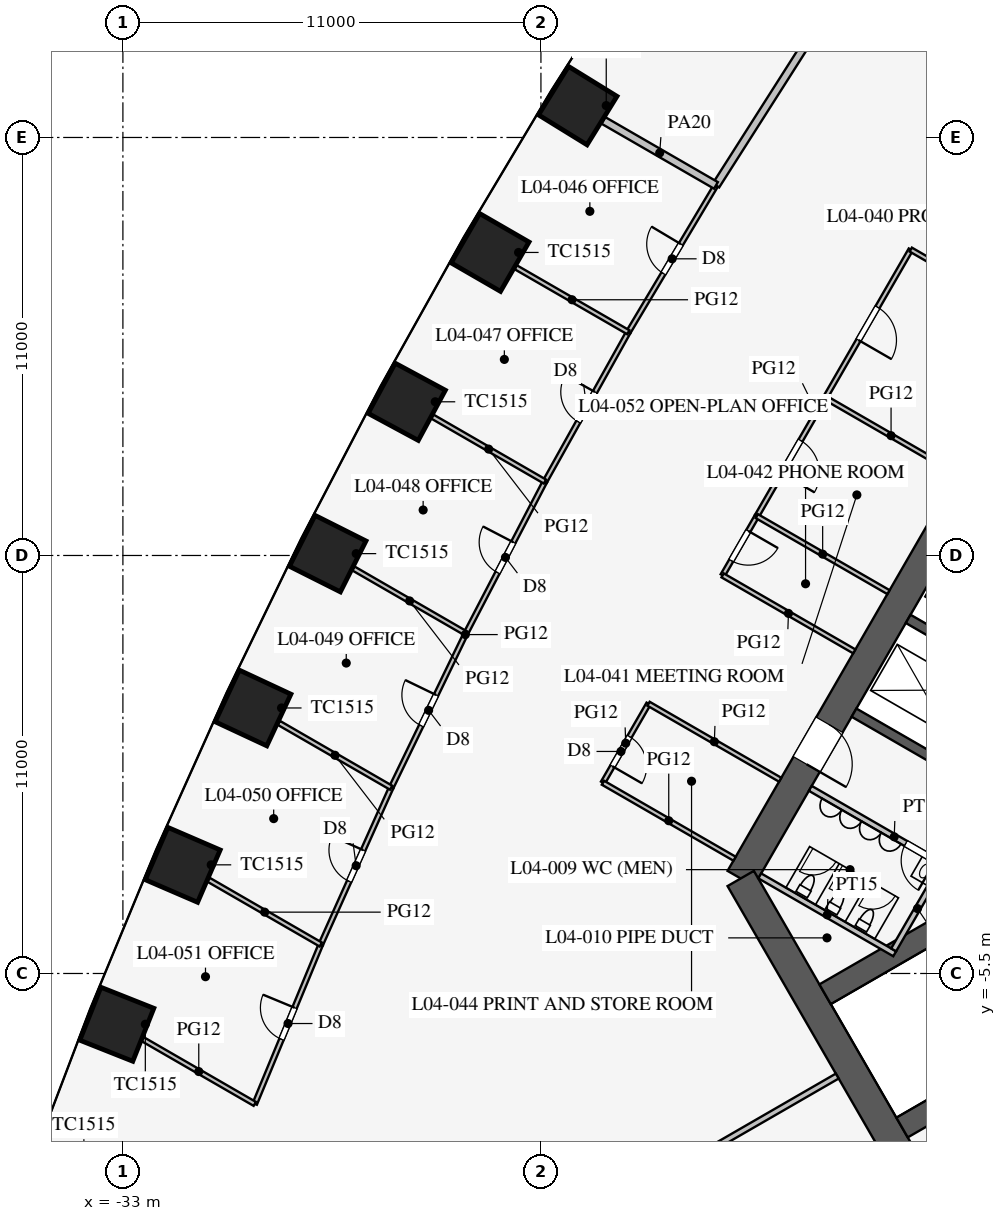
"""IFC4 building model, lengths in metres.
Left out: names, types, materials, properties, quantities, classifications, styles, units other than length and angle.
Written with IfcOpenShell. Run it as: python <this file> out.ifc"""

import sys

from ifc_helpers import new_model, si_unit, direction, frame, frame_2d, origin, origin_2d, place, context, subcontext, project, spatial, rectangle, extrude, element, fill, save


model = new_model("IFC4")
c1 = context("Model", 3, precision=1e-05, world=origin(), true_north=direction((0.0, 1.0)))
c2 = subcontext(c1, "Body", "Model", "MODEL_VIEW")
j1 = project(units=[si_unit("LENGTHUNIT", "METRE"), si_unit("PLANEANGLEUNIT", "RADIAN")], contexts=[c1])
p1 = place(None, origin())
s1 = spatial("IfcSite", under=j1, at=p1, CompositionType="ELEMENT")
p2 = place(p1, origin())
s2 = spatial("IfcBuilding", under=s1, at=p2, CompositionType="ELEMENT")
p3 = place(p2, frame((0.0, 0.0, 20.7)))
s3 = spatial("IfcBuildingStorey", under=s2, at=p3, CompositionType="ELEMENT", Elevation=20.7)
for number, where, z_axis, x_axis in (
    (1, (-21.031, 17.339, 0.0), (0.0, 0.0, 1.0), (-0.525, -0.851, 0.0)),
    (2, (-23.338, 13.474, 0.0), (0.0, 0.0, 1.0), (-0.5, -0.866, 0.0)),
    (3, (-25.531, 9.544, 0.0), (0.0, 0.0, 1.0), (-0.475, -0.88, 0.0)),
    (4, (-27.611, 5.549, 0.0), (0.0, 0.0, 1.0), (-0.449, -0.894, 0.0)),
    (5, (-29.576, 1.487, 0.0), (0.0, 0.0, 1.0), (-0.423, -0.906, 0.0)),
    (6, (-31.426, -2.641, 0.0), (0.0, 0.0, 1.0), (-0.396, -0.918, 0.0)),
    (7, (-33.16, -6.836, 0.0), (0.0, 0.0, 1.0), (-0.369, -0.929, 0.0)),
):
    element("IfcColumn", number, at=place(p3, frame(where, z_axis=z_axis, x_axis=x_axis)), inside=s3, PredefinedType="COLUMN", context=c2, shape_type="SweptSolid", body=[
        extrude(rectangle(XDim=1.5, YDim=1.5, at=origin_2d()), origin(), (0.0, 0.0, 1.0), 4.2),
    ])
p4 = place(p3, frame((-5.773, 16.0, 0.0), z_axis=(0.0, 0.0, 1.0), x_axis=(-0.500002442456, -0.866023993627, 0.0)))
e8 = element("IfcWall", 8, at=p4, inside=s3, PredefinedType="SHEAR", context=c2, shape_type="SweptSolid", body=[
    extrude(rectangle(XDim=21.939, YDim=0.8, at=frame_2d((10.97, 0.0))), origin(), (0.0, 0.0, 1.0), 4.2),
])
p5 = place(p4, frame((17.27, 0.0, 0.0)))
e9 = element("IfcOpeningElement", 9, at=p5, cuts=e8, PredefinedType="OPENING", context=c2, shape_type="SweptSolid", body=[
    extrude(rectangle(XDim=1.2, YDim=2.1, at=frame_2d((0.6, 1.05))), frame((0.0, 0.41, 0.0), z_axis=(0.0, -1.0, 0.0), x_axis=(1.0, 0.0, 0.0)), (0.0, 0.0, 1.0), 0.82),
])
p6 = place(p4, frame((3.47, 0.0, 0.0)))
e10 = element("IfcOpeningElement", 10, at=p6, cuts=e8, PredefinedType="OPENING", context=c2, shape_type="SweptSolid", body=[
    extrude(rectangle(XDim=1.2, YDim=2.1, at=frame_2d((0.6, 1.05))), frame((0.0, 0.41, 0.0), z_axis=(0.0, -1.0, 0.0), x_axis=(1.0, 0.0, 0.0)), (0.0, 0.0, 1.0), 0.82),
])
p7 = place(p3, frame((-16.743, -3.0, 0.0), z_axis=(0.0, 0.0, 1.0), x_axis=(0.499995765644, -0.866027848477, 0.0)))
e11 = element("IfcWall", 11, at=p7, inside=s3, PredefinedType="SHEAR", context=c2, shape_type="SweptSolid", body=[
    extrude(rectangle(XDim=11.547, YDim=0.8, at=frame_2d((5.773, 0.0))), origin(), (0.0, 0.0, 1.0), 4.2),
])
for number, where, z_axis, x_axis in (
    (12, (-10.107, 2.544, 0.0), (0.0, 0.0, 1.0), (-0.866, 0.5, 0.0)),
    (13, (-11.532, 0.076, 0.0), (0.0, 0.0, 1.0), (-0.866, 0.5, 0.0)),
):
    element("IfcWall", number, at=place(p3, frame(where, z_axis=z_axis, x_axis=x_axis)), inside=s3, PredefinedType="SHEAR", context=c2, shape_type="SweptSolid", body=[
        extrude(rectangle(XDim=2.575, YDim=0.25, at=frame_2d((1.288, 0.0))), origin(), (0.0, 0.0, 1.0), 4.2),
    ])
for number, where, z_axis, x_axis in (
    (14, (-6.663, -1.509, 0.0), (0.0, 0.0, 1.0), (-0.866, -0.5, 0.0)),
    (15, (-4.638, -5.016, 0.0), (0.0, 0.0, 1.0), (-0.866, -0.5, 0.0)),
):
    element("IfcWall", number, at=place(p3, frame(where, z_axis=z_axis, x_axis=x_axis)), inside=s3, PredefinedType="SHEAR", context=c2, shape_type="SweptSolid", body=[
        extrude(rectangle(XDim=9.075, YDim=0.6, at=frame_2d((4.538, 0.0))), origin(), (0.0, 0.0, 1.0), 4.2),
    ])
p8 = place(p3, frame((-10.495, -3.178, 0.0), z_axis=(0.0, 0.0, 1.0), x_axis=(-0.86602216432, 0.500005610874, 0.0)))
e16 = element("IfcWall", 16, at=p8, inside=s3, PredefinedType="PARTITIONING", context=c2, shape_type="SweptSolid", body=[
    extrude(rectangle(XDim=5.1, YDim=0.15, at=frame_2d((2.55, 0.0))), origin(), (0.0, 0.0, 1.0), 4.0),
])
p9 = place(p8, frame((1.3, 0.0, 0.0)))
e17 = element("IfcOpeningElement", 17, at=p9, cuts=e16, PredefinedType="OPENING", context=c2, shape_type="SweptSolid", body=[
    extrude(rectangle(XDim=0.9, YDim=2.1, at=frame_2d((0.45, 1.05))), frame((0.0, 0.085, 0.0), z_axis=(0.0, -1.0, 0.0), x_axis=(1.0, 0.0, 0.0)), (0.0, 0.0, 1.0), 0.17),
])
p10 = place(p3, frame((-12.691, -4.982, 0.0), z_axis=(0.0, 0.0, 1.0), x_axis=(-0.8660249478, 0.500000789788, 0.0)))
e18 = element("IfcWall", 18, at=p10, inside=s3, PredefinedType="PARTITIONING", context=c2, shape_type="SweptSolid", body=[
    extrude(rectangle(XDim=4.1, YDim=0.15, at=frame_2d((2.05, 0.0))), origin(), (0.0, 0.0, 1.0), 4.0),
])
p11 = place(p3, frame((-11.464, -2.706, 0.0), z_axis=(0.0, 0.0, 1.0), x_axis=(-0.50001992892, -0.866013897511, 0.0)))
e19 = element("IfcWall", 19, at=p11, inside=s3, PredefinedType="PARTITIONING", context=c2, shape_type="SweptSolid", body=[
    extrude(rectangle(XDim=2.51, YDim=0.15, at=frame_2d((1.255, 0.0))), origin(), (0.0, 0.0, 1.0), 4.0),
])
p12 = place(p3, frame((-14.203, -8.2, 0.0), z_axis=(0.0, 0.0, 1.0), x_axis=(-0.866024965723, -0.500000758745, 0.0)))
e20 = element("IfcWall", 20, at=p12, inside=s3, PredefinedType="PARTITIONING", context=c2, shape_type="SweptSolid", body=[
    extrude(rectangle(XDim=18.25, YDim=0.15, at=frame_2d((9.125, 0.0))), origin(), (0.0, 0.0, 1.0), 2.3),
])
p13 = place(p3, frame((-16.319, 6.535, 0.0), z_axis=(0.0, 0.0, 1.0), x_axis=(-0.499961193289, -0.866047807691, 0.0)))
e21 = element("IfcWall", 21, at=p13, inside=s3, PredefinedType="PARTITIONING", context=c2, shape_type="SweptSolid", body=[
    extrude(rectangle(XDim=1.8, YDim=0.12, at=frame_2d((0.9, 0.0))), origin(), (0.0, 0.0, 1.0), 2.9),
])
p14 = place(p13, frame((0.45, 0.0, 0.15)))
e22 = element("IfcOpeningElement", 22, at=p14, cuts=e21, PredefinedType="OPENING", context=c2, shape_type="SweptSolid", body=[
    extrude(rectangle(XDim=0.9, YDim=2.1, at=frame_2d((0.45, 1.05))), frame((0.0, 0.07, 0.0), z_axis=(0.0, -1.0, 0.0), x_axis=(1.0, 0.0, 0.0)), (0.0, 0.0, 1.0), 0.14),
])
p15 = place(p3, frame((-19.169, 1.599, 0.0), z_axis=(0.0, 0.0, 1.0), x_axis=(-0.499957262057, -0.866050077142, 0.0)))
e23 = element("IfcWall", 23, at=p15, inside=s3, PredefinedType="PARTITIONING", context=c2, shape_type="SweptSolid", body=[
    extrude(rectangle(XDim=2.4, YDim=0.12, at=frame_2d((1.2, 0.0))), origin(), (0.0, 0.0, 1.0), 2.9),
])
p16 = place(p15, frame((1.0, 0.0, 0.15)))
e24 = element("IfcOpeningElement", 24, at=p16, cuts=e23, PredefinedType="OPENING", context=c2, shape_type="SweptSolid", body=[
    extrude(rectangle(XDim=0.9, YDim=2.1, at=frame_2d((0.45, 1.05))), frame((0.0, 0.07, 0.0), z_axis=(0.0, -1.0, 0.0), x_axis=(1.0, 0.0, 0.0)), (0.0, 0.0, 1.0), 0.14),
])
p17 = place(p3, frame((-14.519, 9.653, 0.0), z_axis=(0.0, 0.0, 1.0), x_axis=(-0.500012057535, -0.866018442252, 0.0)))
e25 = element("IfcWall", 25, at=p17, inside=s3, PredefinedType="PARTITIONING", context=c2, shape_type="SweptSolid", body=[
    extrude(rectangle(XDim=3.6, YDim=0.12, at=frame_2d((1.8, 0.0))), origin(), (0.0, 0.0, 1.0), 2.9),
])
p18 = place(p17, frame((1.3, 0.0, 0.15)))
e26 = element("IfcOpeningElement", 26, at=p18, cuts=e25, PredefinedType="OPENING", context=c2, shape_type="SweptSolid", body=[
    extrude(rectangle(XDim=1.0, YDim=2.1, at=frame_2d((0.5, 1.05))), frame((0.0, 0.07, 0.0), z_axis=(0.0, -1.0, 0.0), x_axis=(1.0, 0.0, 0.0)), (0.0, 0.0, 1.0), 0.14),
])
p19 = place(p3, frame((-12.269, 13.55, 0.0), z_axis=(0.0, 0.0, 1.0), x_axis=(-0.499990139034, -0.866031096941, 0.0)))
e27 = element("IfcWall", 27, at=p19, inside=s3, PredefinedType="PARTITIONING", context=c2, shape_type="SweptSolid", body=[
    extrude(rectangle(XDim=4.5, YDim=0.12, at=frame_2d((2.25, 0.0))), origin(), (0.0, 0.0, 1.0), 2.9),
])
p20 = place(p19, frame((1.75, 0.0, 0.15)))
e28 = element("IfcOpeningElement", 28, at=p20, cuts=e27, PredefinedType="OPENING", context=c2, shape_type="SweptSolid", body=[
    extrude(rectangle(XDim=1.0, YDim=2.1, at=frame_2d((0.5, 1.05))), frame((0.0, 0.07, 0.0), z_axis=(0.0, -1.0, 0.0), x_axis=(1.0, 0.0, 0.0)), (0.0, 0.0, 1.0), 0.14),
])
for number, where, z_axis, x_axis in (
    (29, (-16.905, -2.48, 0.0), (0.0, 0.0, 1.0), (-0.866, 0.5, 0.0)),
    (30, (-12.855, 4.535, 0.0), (0.0, 0.0, 1.0), (-0.866, 0.5, 0.0)),
    (31, (-13.755, 2.976, 0.0), (0.0, 0.0, 1.0), (-0.866, 0.5, 0.0)),
    (32, (-15.705, -0.401, 0.0), (0.0, 0.0, 1.0), (-0.866, 0.5, 0.0)),
    (33, (-11.055, 7.653, 0.0), (0.0, 0.0, 1.0), (-0.866, 0.5, 0.0)),
    (34, (-8.805, 11.55, 0.0), (0.0, 0.0, 1.0), (-0.866, 0.5, 0.0)),
):
    element("IfcWall", number, at=place(p3, frame(where, z_axis=z_axis, x_axis=x_axis)), inside=s3, PredefinedType="PARTITIONING", context=c2, shape_type="SweptSolid", body=[
        extrude(rectangle(XDim=4.0, YDim=0.12, at=frame_2d((2.0, 0.0))), origin(), (0.0, 0.0, 1.0), 2.9),
    ])
p21 = place(p3, frame((-19.701, 11.374, 0.0), z_axis=(0.0, 0.0, 1.0), x_axis=(-0.487415216275, -0.87317031955, 0.0)))
e35 = element("IfcWall", 35, at=p21, inside=s3, PredefinedType="PARTITIONING", context=c2, shape_type="SweptSolid", body=[
    extrude(rectangle(XDim=4.5, YDim=0.12, at=frame_2d((2.25, 0.0))), origin(), (0.0, 0.0, 1.0), 2.9),
])
p22 = place(p21, frame((1.8, 0.0, 0.15)))
e36 = element("IfcOpeningElement", 36, at=p22, cuts=e35, PredefinedType="OPENING", context=c2, shape_type="SweptSolid", body=[
    extrude(rectangle(XDim=0.9, YDim=2.1, at=frame_2d((0.45, 1.05))), frame((0.0, 0.07, 0.0), z_axis=(0.0, -1.0, 0.0), x_axis=(1.0, 0.0, 0.0)), (0.0, 0.0, 1.0), 0.14),
])
p23 = place(p3, frame((-25.941, -0.611, 0.0), z_axis=(0.0, 0.0, 1.0), x_axis=(-0.409451055745, -0.912332084796, 0.0)))
e37 = element("IfcWall", 37, at=p23, inside=s3, PredefinedType="PARTITIONING", context=c2, shape_type="SweptSolid", body=[
    extrude(rectangle(XDim=4.523, YDim=0.12, at=frame_2d((2.262, 0.0))), origin(), (0.0, 0.0, 1.0), 2.9),
])
p24 = place(p23, frame((1.8, 0.0, 0.15)))
e38 = element("IfcOpeningElement", 38, at=p24, cuts=e37, PredefinedType="OPENING", context=c2, shape_type="SweptSolid", body=[
    extrude(rectangle(XDim=0.9, YDim=2.1, at=frame_2d((0.45, 1.05))), frame((0.0, 0.07, 0.0), z_axis=(0.0, -1.0, 0.0), x_axis=(1.0, 0.0, 0.0)), (0.0, 0.0, 1.0), 0.14),
])
p25 = place(p3, frame((-27.793, -4.738, 0.0), z_axis=(0.0, 0.0, 1.0), x_axis=(-0.382639984525, -0.923897527999, 0.0)))
e39 = element("IfcWall", 39, at=p25, inside=s3, PredefinedType="PARTITIONING", context=c2, shape_type="SweptSolid", body=[
    extrude(rectangle(XDim=4.539, YDim=0.12, at=frame_2d((2.27, 0.0))), origin(), (0.0, 0.0, 1.0), 2.9),
])
p26 = place(p25, frame((1.8, 0.0, 0.15)))
e40 = element("IfcOpeningElement", 40, at=p26, cuts=e39, PredefinedType="OPENING", context=c2, shape_type="SweptSolid", body=[
    extrude(rectangle(XDim=0.9, YDim=2.1, at=frame_2d((0.45, 1.05))), frame((0.0, 0.07, 0.0), z_axis=(0.0, -1.0, 0.0), x_axis=(1.0, 0.0, 0.0)), (0.0, 0.0, 1.0), 0.14),
])
p27 = place(p3, frame((-21.895, 7.445, 0.0), z_axis=(0.0, 0.0, 1.0), x_axis=(-0.461810056307, -0.886978845235, 0.0)))
e41 = element("IfcWall", 41, at=p27, inside=s3, PredefinedType="PARTITIONING", context=c2, shape_type="SweptSolid", body=[
    extrude(rectangle(XDim=4.504, YDim=0.12, at=frame_2d((2.252, 0.0))), origin(), (0.0, 0.0, 1.0), 2.9),
])
p28 = place(p27, frame((1.8, 0.0, 0.15)))
e42 = element("IfcOpeningElement", 42, at=p28, cuts=e41, PredefinedType="OPENING", context=c2, shape_type="SweptSolid", body=[
    extrude(rectangle(XDim=0.9, YDim=2.1, at=frame_2d((0.45, 1.05))), frame((0.0, 0.07, 0.0), z_axis=(0.0, -1.0, 0.0), x_axis=(1.0, 0.0, 0.0)), (0.0, 0.0, 1.0), 0.14),
])
p29 = place(p3, frame((-23.975, 3.449, 0.0), z_axis=(0.0, 0.0, 1.0), x_axis=(-0.435857917556, -0.900015486369, 0.0)))
e43 = element("IfcWall", 43, at=p29, inside=s3, PredefinedType="PARTITIONING", context=c2, shape_type="SweptSolid", body=[
    extrude(rectangle(XDim=4.512, YDim=0.12, at=frame_2d((2.256, 0.0))), origin(), (0.0, 0.0, 1.0), 2.9),
])
p30 = place(p29, frame((1.8, 0.0, 0.15)))
e44 = element("IfcOpeningElement", 44, at=p30, cuts=e43, PredefinedType="OPENING", context=c2, shape_type="SweptSolid", body=[
    extrude(rectangle(XDim=0.9, YDim=2.1, at=frame_2d((0.45, 1.05))), frame((0.0, 0.07, 0.0), z_axis=(0.0, -1.0, 0.0), x_axis=(1.0, 0.0, 0.0)), (0.0, 0.0, 1.0), 0.14),
])
p31 = place(p3, frame((-17.395, 15.239, 0.0), z_axis=(0.0, 0.0, 1.0), x_axis=(-0.512483962191, -0.858696796604, 0.0)))
e45 = element("IfcWall", 45, at=p31, inside=s3, PredefinedType="PARTITIONING", context=c2, shape_type="SweptSolid", body=[
    extrude(rectangle(XDim=4.5, YDim=0.12, at=frame_2d((2.25, 0.0))), origin(), (0.0, 0.0, 1.0), 2.9),
])
p32 = place(p31, frame((1.8, 0.0, 0.15)))
e46 = element("IfcOpeningElement", 46, at=p32, cuts=e45, PredefinedType="OPENING", context=c2, shape_type="SweptSolid", body=[
    extrude(rectangle(XDim=0.9, YDim=2.1, at=frame_2d((0.45, 1.05))), frame((0.0, 0.07, 0.0), z_axis=(0.0, -1.0, 0.0), x_axis=(1.0, 0.0, 0.0)), (0.0, 0.0, 1.0), 0.14),
])
p33 = place(p3, frame((-14.975, 19.038, 0.0), z_axis=(0.0, 0.0, 1.0), x_axis=(-0.537243691336, -0.843427066272, 0.0)))
e47 = element("IfcWall", 47, at=p33, inside=s3, PredefinedType="PARTITIONING", context=c2, shape_type="SweptSolid", body=[
    extrude(rectangle(XDim=4.504, YDim=0.2, at=frame_2d((2.252, 0.0))), origin(), (0.0, 0.0, 1.0), 2.9),
])
p34 = place(p3, frame((-19.701, 11.374, 0.0), z_axis=(0.0, 0.0, 1.0), x_axis=(-0.866007273829, 0.50003140069, 0.0)))
e48 = element("IfcWall", 48, at=p34, inside=s3, PredefinedType="PARTITIONING", context=c2, shape_type="SweptSolid", body=[
    extrude(rectangle(XDim=3.42, YDim=0.12, at=frame_2d((1.71, 0.0))), origin(), (0.0, 0.0, 1.0), 2.9),
])
p35 = place(p3, frame((-25.941, -0.611, 0.0), z_axis=(0.0, 0.0, 1.0), x_axis=(-0.866016478054, 0.500015459501, 0.0)))
e49 = element("IfcWall", 49, at=p35, inside=s3, PredefinedType="PARTITIONING", context=c2, shape_type="SweptSolid", body=[
    extrude(rectangle(XDim=3.414, YDim=0.12, at=frame_2d((1.707, 0.0))), origin(), (0.0, 0.0, 1.0), 2.9),
])
p36 = place(p3, frame((-27.793, -4.738, 0.0), z_axis=(0.0, 0.0, 1.0), x_axis=(-0.866040105854, 0.499974534403, 0.0)))
e50 = element("IfcWall", 50, at=p36, inside=s3, PredefinedType="PARTITIONING", context=c2, shape_type="SweptSolid", body=[
    extrude(rectangle(XDim=3.409, YDim=0.12, at=frame_2d((1.705, 0.0))), origin(), (0.0, 0.0, 1.0), 2.9),
])
p37 = place(p3, frame((-29.53, -8.932, 0.0), z_axis=(0.0, 0.0, 1.0), x_axis=(-0.866018335219, 0.500012242915, 0.0)))
e51 = element("IfcWall", 51, at=p37, inside=s3, PredefinedType="PARTITIONING", context=c2, shape_type="SweptSolid", body=[
    extrude(rectangle(XDim=3.403, YDim=0.12, at=frame_2d((1.702, 0.0))), origin(), (0.0, 0.0, 1.0), 2.9),
])
p38 = place(p3, frame((-21.895, 7.445, 0.0), z_axis=(0.0, 0.0, 1.0), x_axis=(-0.866015553834, 0.500017060227, 0.0)))
e52 = element("IfcWall", 52, at=p38, inside=s3, PredefinedType="PARTITIONING", context=c2, shape_type="SweptSolid", body=[
    extrude(rectangle(XDim=3.419, YDim=0.12, at=frame_2d((1.71, 0.0))), origin(), (0.0, 0.0, 1.0), 2.9),
])
p39 = place(p3, frame((-23.975, 3.449, 0.0), z_axis=(0.0, 0.0, 1.0), x_axis=(-0.866014265796, 0.500019291066, 0.0)))
e53 = element("IfcWall", 53, at=p39, inside=s3, PredefinedType="PARTITIONING", context=c2, shape_type="SweptSolid", body=[
    extrude(rectangle(XDim=3.417, YDim=0.12, at=frame_2d((1.708, 0.0))), origin(), (0.0, 0.0, 1.0), 2.9),
])
p40 = place(p3, frame((-17.395, 15.239, 0.0), z_axis=(0.0, 0.0, 1.0), x_axis=(-0.866015553834, 0.500017060227, 0.0)))
e54 = element("IfcWall", 54, at=p40, inside=s3, PredefinedType="PARTITIONING", context=c2, shape_type="SweptSolid", body=[
    extrude(rectangle(XDim=3.419, YDim=0.2, at=frame_2d((1.71, 0.0))), origin(), (0.0, 0.0, 1.0), 2.9),
])
p41 = place(p9, origin())
e55 = element("IfcDoor", 55, at=p41, inside=s3, OperationType="SINGLE_SWING_LEFT", PredefinedType="DOOR", context=c2, shape_type="SweptSolid", body=[
    extrude(rectangle(XDim=0.9, YDim=2.1, at=frame_2d((0.45, 1.05))), frame((0.0, 0.025, 0.0), z_axis=(0.0, -1.0, 0.0), x_axis=(1.0, 0.0, 0.0)), (0.0, 0.0, 1.0), 0.05),
])
fill(e17, e55)
p42 = place(p5, origin())
e56 = element("IfcDoor", 56, at=p42, inside=s3, OperationType="SINGLE_SWING_RIGHT", PredefinedType="DOOR", context=c2, shape_type="SweptSolid", body=[
    extrude(rectangle(XDim=1.2, YDim=2.1, at=frame_2d((0.6, 1.05))), frame((0.0, 0.025, 0.0), z_axis=(0.0, -1.0, 0.0), x_axis=(1.0, 0.0, 0.0)), (0.0, 0.0, 1.0), 0.05),
])
fill(e9, e56)
p43 = place(p20, origin())
e57 = element("IfcDoor", 57, at=p43, inside=s3, OperationType="SINGLE_SWING_RIGHT", PredefinedType="DOOR", context=c2, shape_type="SweptSolid", body=[
    extrude(rectangle(XDim=1.0, YDim=2.1, at=frame_2d((0.5, 1.05))), frame((0.0, 0.025, 0.0), z_axis=(0.0, -1.0, 0.0), x_axis=(1.0, 0.0, 0.0)), (0.0, 0.0, 1.0), 0.05),
])
fill(e28, e57)
p44 = place(p18, origin())
e58 = element("IfcDoor", 58, at=p44, inside=s3, OperationType="SINGLE_SWING_RIGHT", PredefinedType="DOOR", context=c2, shape_type="SweptSolid", body=[
    extrude(rectangle(XDim=1.0, YDim=2.1, at=frame_2d((0.5, 1.05))), frame((0.0, 0.025, 0.0), z_axis=(0.0, -1.0, 0.0), x_axis=(1.0, 0.0, 0.0)), (0.0, 0.0, 1.0), 0.05),
])
fill(e26, e58)
p45 = place(p14, origin())
e59 = element("IfcDoor", 59, at=p45, inside=s3, OperationType="SINGLE_SWING_LEFT", PredefinedType="DOOR", context=c2, shape_type="SweptSolid", body=[
    extrude(rectangle(XDim=0.9, YDim=2.1, at=frame_2d((0.45, 1.05))), frame((0.0, 0.025, 0.0), z_axis=(0.0, -1.0, 0.0), x_axis=(1.0, 0.0, 0.0)), (0.0, 0.0, 1.0), 0.05),
])
fill(e22, e59)
p46 = place(p16, origin())
e60 = element("IfcDoor", 60, at=p46, inside=s3, OperationType="SINGLE_SWING_RIGHT", PredefinedType="DOOR", context=c2, shape_type="SweptSolid", body=[
    extrude(rectangle(XDim=0.9, YDim=2.1, at=frame_2d((0.45, 1.05))), frame((0.0, 0.025, 0.0), z_axis=(0.0, -1.0, 0.0), x_axis=(1.0, 0.0, 0.0)), (0.0, 0.0, 1.0), 0.05),
])
fill(e24, e60)
p47 = place(p32, frame((0.9, 0.0, 0.0), z_axis=(0.0, 0.0, 1.0), x_axis=(-1.0, 0.0, 0.0)))
e61 = element("IfcDoor", 61, at=p47, inside=s3, OperationType="SINGLE_SWING_RIGHT", PredefinedType="DOOR", context=c2, shape_type="SweptSolid", body=[
    extrude(rectangle(XDim=0.9, YDim=2.1, at=frame_2d((0.45, 1.05))), frame((0.0, 0.025, 0.0), z_axis=(0.0, -1.0, 0.0), x_axis=(1.0, 0.0, 0.0)), (0.0, 0.0, 1.0), 0.05),
])
fill(e46, e61)
p48 = place(p22, frame((0.9, 0.0, 0.0), z_axis=(0.0, 0.0, 1.0), x_axis=(-1.0, 0.0, 0.0)))
e62 = element("IfcDoor", 62, at=p48, inside=s3, OperationType="SINGLE_SWING_RIGHT", PredefinedType="DOOR", context=c2, shape_type="SweptSolid", body=[
    extrude(rectangle(XDim=0.9, YDim=2.1, at=frame_2d((0.45, 1.05))), frame((0.0, 0.025, 0.0), z_axis=(0.0, -1.0, 0.0), x_axis=(1.0, 0.0, 0.0)), (0.0, 0.0, 1.0), 0.05),
])
fill(e36, e62)
p49 = place(p28, frame((0.9, 0.0, 0.0), z_axis=(0.0, 0.0, 1.0), x_axis=(-1.0, 0.0, 0.0)))
e63 = element("IfcDoor", 63, at=p49, inside=s3, OperationType="SINGLE_SWING_RIGHT", PredefinedType="DOOR", context=c2, shape_type="SweptSolid", body=[
    extrude(rectangle(XDim=0.9, YDim=2.1, at=frame_2d((0.45, 1.05))), frame((0.0, 0.025, 0.0), z_axis=(0.0, -1.0, 0.0), x_axis=(1.0, 0.0, 0.0)), (0.0, 0.0, 1.0), 0.05),
])
fill(e42, e63)
p50 = place(p30, frame((0.9, 0.0, 0.0), z_axis=(0.0, 0.0, 1.0), x_axis=(-1.0, 0.0, 0.0)))
e64 = element("IfcDoor", 64, at=p50, inside=s3, OperationType="SINGLE_SWING_RIGHT", PredefinedType="DOOR", context=c2, shape_type="SweptSolid", body=[
    extrude(rectangle(XDim=0.9, YDim=2.1, at=frame_2d((0.45, 1.05))), frame((0.0, 0.025, 0.0), z_axis=(0.0, -1.0, 0.0), x_axis=(1.0, 0.0, 0.0)), (0.0, 0.0, 1.0), 0.05),
])
fill(e44, e64)
p51 = place(p24, frame((0.9, 0.0, 0.0), z_axis=(0.0, 0.0, 1.0), x_axis=(-1.0, 0.0, 0.0)))
e65 = element("IfcDoor", 65, at=p51, inside=s3, OperationType="SINGLE_SWING_RIGHT", PredefinedType="DOOR", context=c2, shape_type="SweptSolid", body=[
    extrude(rectangle(XDim=0.9, YDim=2.1, at=frame_2d((0.45, 1.05))), frame((0.0, 0.025, 0.0), z_axis=(0.0, -1.0, 0.0), x_axis=(1.0, 0.0, 0.0)), (0.0, 0.0, 1.0), 0.05),
])
fill(e38, e65)
p52 = place(p26, frame((0.9, 0.0, 0.0), z_axis=(0.0, 0.0, 1.0), x_axis=(-1.0, 0.0, 0.0)))
e66 = element("IfcDoor", 66, at=p52, inside=s3, OperationType="SINGLE_SWING_RIGHT", PredefinedType="DOOR", context=c2, shape_type="SweptSolid", body=[
    extrude(rectangle(XDim=0.9, YDim=2.1, at=frame_2d((0.45, 1.05))), frame((0.0, 0.025, 0.0), z_axis=(0.0, -1.0, 0.0), x_axis=(1.0, 0.0, 0.0)), (0.0, 0.0, 1.0), 0.05),
])
fill(e40, e66)
save(model, sys.argv[1])
